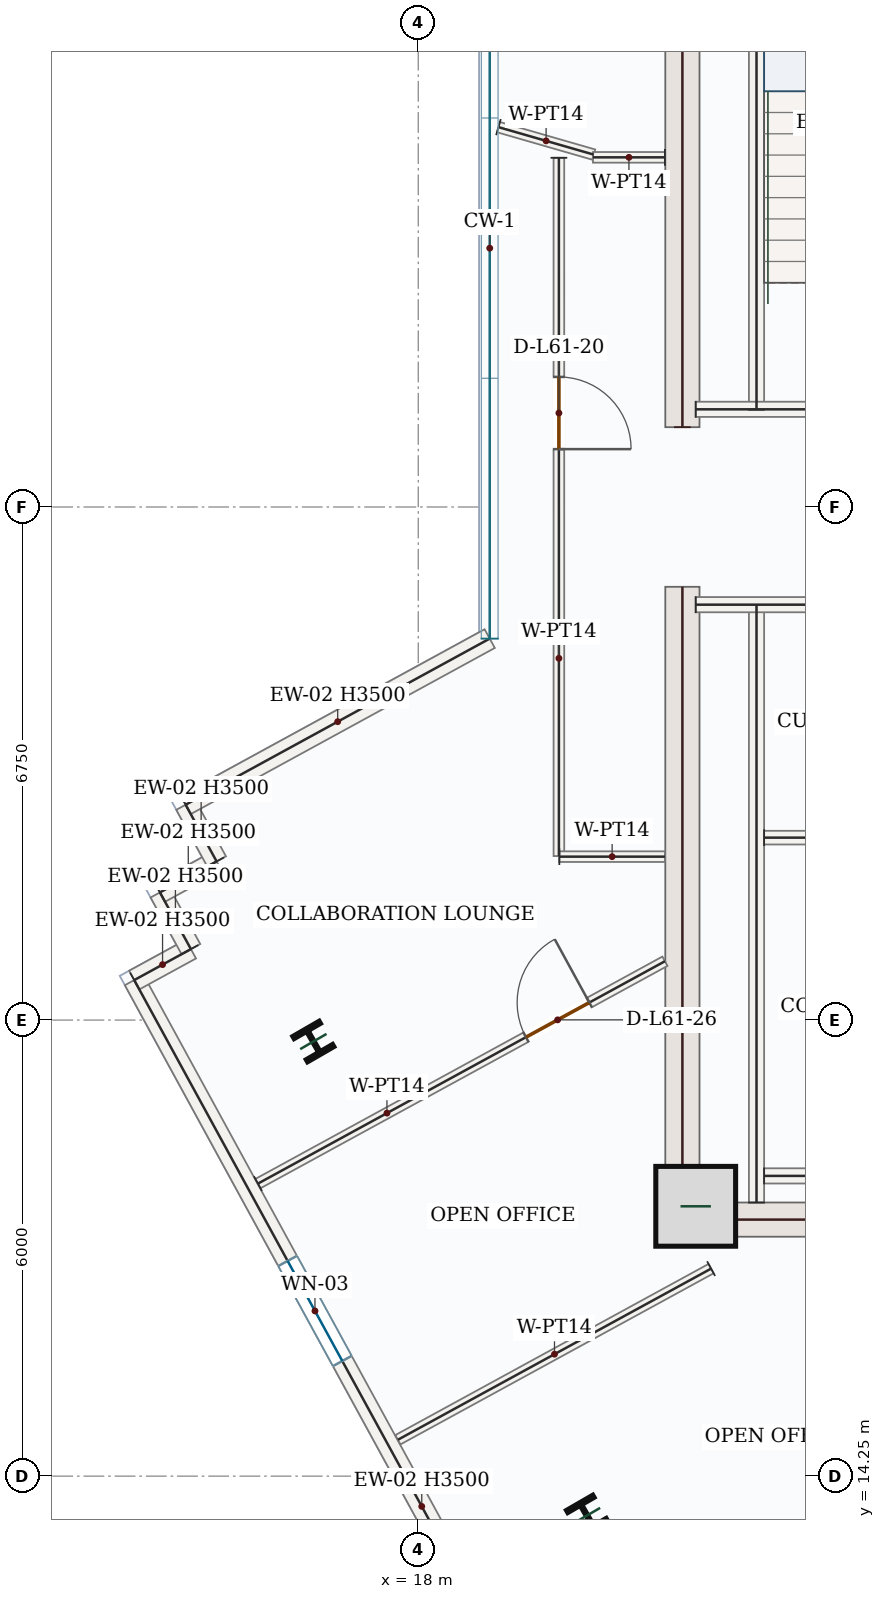
"""IFC4 building model, lengths in metres.
Left out: names, types, materials, properties, quantities, classifications, styles, units other than length and angle.
Written with IfcOpenShell. Run it as: python <this file> out.ifc"""

import sys

from ifc_helpers import new_model, si_unit, direction, frame, frame_2d, origin, origin_2d, place, context, subcontext, project, spatial, rectangle, i_section, extrude, source, transform, mapped, element, fill, save


model = new_model("IFC4")
c1 = context("Model", 3, precision=1e-05, world=origin(), true_north=direction((0.0, 1.0)))
c2 = subcontext(c1, "Body", "Model", "MODEL_VIEW")
j1 = project(units=[si_unit("LENGTHUNIT", "METRE"), si_unit("PLANEANGLEUNIT", "RADIAN")], contexts=[c1])
p1 = place(None, origin())
s1 = spatial("IfcSite", under=j1, at=p1, CompositionType="ELEMENT")
p2 = place(p1, origin())
s2 = spatial("IfcBuilding", under=s1, at=p2, CompositionType="ELEMENT")
p3 = place(p2, frame((0.0, 0.0, 257.85)))
s3 = spatial("IfcBuildingStorey", under=s2, at=p3, CompositionType="ELEMENT", Elevation=257.85)
m1 = source(origin(), c2, "Body", "SweptSolid", [
    extrude(rectangle(XDim=8.55, YDim=0.45, at=frame_2d((4.275, 0.0))), origin(), (0.0, 0.0, 1.0), 3.5),
])
for number, where, z_axis, x_axis in (
    (1, (21.475, 17.4, 0.0), (0.0, 0.0, 1.0), (0.0, 1.0, 0.0)),
    (2, (21.475, 28.05, 0.0), (0.0, 0.0, 1.0), (0.0, 1.0, 0.0)),
):
    element("IfcWall", number, at=place(p3, frame(where, z_axis=z_axis, x_axis=x_axis)), inside=s3, PredefinedType="SHEAR", context=c2, shape_type="MappedRepresentation", body=[
        mapped(m1, transform((0.0, 0.0, 0.0), x_axis=(1.0, 0.0, 0.0), y_axis=(0.0, 1.0, 0.0), z_axis=(0.0, 0.0, 1.0), scale=1.0)),
    ])
m2 = source(origin(), c2, "Body", "SweptSolid", [
    extrude(rectangle(XDim=7.1, YDim=0.45, at=frame_2d((3.55, 0.0))), origin(), (0.0, 0.0, 1.0), 3.5),
])
p4 = place(p3, frame((21.7, 17.625, 0.0), z_axis=(0.0, 0.0, 1.0), x_axis=(1.0, 0.0, 0.0)))
e3 = element("IfcWall", 3, at=p4, inside=s3, PredefinedType="SHEAR", context=c2, shape_type="MappedRepresentation", body=[
    mapped(m2, transform((0.0, 0.0, 0.0), x_axis=(1.0, 0.0, 0.0), y_axis=(0.0, 1.0, 0.0), z_axis=(0.0, 0.0, 1.0), scale=1.0)),
])
m3 = source(origin(), c2, "Body", "SweptSolid", [
    extrude(rectangle(XDim=1.05, YDim=1.05, at=origin_2d()), origin(), (0.0, 0.0, 1.0), 3.75),
])
p5 = place(p3, frame((21.65, 17.8, 0.0), z_axis=(0.0, 0.0, 1.0), x_axis=(1.0, 0.0, 0.0)))
e4 = element("IfcColumn", 4, at=p5, inside=s3, PredefinedType="COLUMN", context=c2, shape_type="MappedRepresentation", body=[
    mapped(m3, transform((0.0, 0.0, 0.0), x_axis=(1.0, 0.0, 0.0), y_axis=(0.0, 1.0, 0.0), z_axis=(0.0, 0.0, 1.0), scale=1.0)),
])
m4 = source(origin(), c2, "Body", "SweptSolid", [
    extrude(i_section(OverallWidth=0.399, OverallDepth=0.386, WebThickness=0.021, FlangeThickness=0.033, FilletRadius=0.018, at=origin_2d()), origin(), (0.0, 0.0, 1.0), 3.75),
])
for number, where, z_axis, x_axis in (
    (5, (16.62, 19.968, 0.0), (0.0, 0.0, 1.0), (0.866, 0.5, 0.0)),
    (6, (20.22, 13.732, 0.0), (0.0, 0.0, 1.0), (0.866, 0.5, 0.0)),
):
    element("IfcColumn", number, at=place(p3, frame(where, z_axis=z_axis, x_axis=x_axis)), inside=s3, PredefinedType="COLUMN", context=c2, shape_type="MappedRepresentation", body=[
        mapped(m4, transform((0.0, 0.0, 0.0), x_axis=(1.0, 0.0, 0.0), y_axis=(0.0, 1.0, 0.0), z_axis=(0.0, 0.0, 1.0), scale=1.0)),
    ])
p6 = place(p3, frame((27.451, 14.74, 0.0), z_axis=(0.0, 0.0, 1.0), x_axis=(-0.877569176667, -0.479450039279, 0.0)))
e7 = element("IfcWall", 7, at=p6, inside=s3, PredefinedType="SOLIDWALL", context=c2, shape_type="SweptSolid", body=[
    extrude(rectangle(XDim=6.979, YDim=0.28, at=frame_2d((3.49, 0.0))), origin(), (0.0, 0.0, 1.0), 3.5),
])
p7 = place(p6, frame((2.74, 0.0, 0.85)))
e8 = element("IfcOpeningElement", 8, at=p7, cuts=e7, PredefinedType="OPENING", context=c2, shape_type="SweptSolid", body=[
    extrude(rectangle(XDim=1.5, YDim=1.5, at=frame_2d((0.75, 0.75))), frame((0.0, 0.15, 0.0), z_axis=(0.0, -1.0, 0.0), x_axis=(1.0, 0.0, 0.0)), (0.0, 0.0, 1.0), 0.3),
])
p8 = place(p3, frame((19.019, 12.071, 0.0), z_axis=(0.0, 0.0, 1.0), x_axis=(-0.479472774144, 0.877556755347, 0.0)))
e9 = element("IfcWall", 9, at=p8, inside=s3, PredefinedType="SOLIDWALL", context=c2, shape_type="SweptSolid", body=[
    extrude(rectangle(XDim=9.92, YDim=0.28, at=frame_2d((4.96, 0.0))), origin(), (0.0, 0.0, 1.0), 3.5),
])
p9 = place(p8, frame((4.21, 0.0, 0.85)))
e10 = element("IfcOpeningElement", 10, at=p9, cuts=e9, PredefinedType="OPENING", context=c2, shape_type="SweptSolid", body=[
    extrude(rectangle(XDim=1.5, YDim=1.5, at=frame_2d((0.75, 0.75))), frame((0.0, 0.15, 0.0), z_axis=(0.0, -1.0, 0.0), x_axis=(1.0, 0.0, 0.0)), (0.0, 0.0, 1.0), 0.3),
])
m5 = source(origin(), c2, "Body", "SweptSolid", [
    extrude(rectangle(XDim=0.85, YDim=0.28, at=frame_2d((0.425, 0.0))), origin(), (0.0, 0.0, 1.0), 3.5),
])
p10 = place(p3, frame((14.263, 20.776, 0.0), z_axis=(0.0, 0.0, 1.0), x_axis=(0.87752219781, 0.479536017782, 0.0)))
e11 = element("IfcWall", 11, at=p10, inside=s3, PredefinedType="SOLIDWALL", context=c2, shape_type="MappedRepresentation", body=[
    mapped(m5, transform((0.0, 0.0, 0.0), x_axis=(1.0, 0.0, 0.0), y_axis=(0.0, 1.0, 0.0), z_axis=(0.0, 0.0, 1.0), scale=1.0)),
])
m6 = source(origin(), c2, "Body", "SweptSolid", [
    extrude(rectangle(XDim=0.85, YDim=0.28, at=frame_2d((0.425, 0.0))), origin(), (0.0, 0.0, 1.0), 3.5),
])
for number, where, z_axis, x_axis in (
    (12, (15.009, 21.184, 0.0), (0.0, 0.0, 1.0), (-0.479, 0.878, 0.0)),
    (13, (14.601, 21.929, 0.0), (0.0, 0.0, 1.0), (0.878, 0.479, 0.0)),
):
    element("IfcWall", number, at=place(p3, frame(where, z_axis=z_axis, x_axis=x_axis)), inside=s3, PredefinedType="SOLIDWALL", context=c2, shape_type="MappedRepresentation", body=[
        mapped(m6, transform((0.0, 0.0, 0.0), x_axis=(1.0, 0.0, 0.0), y_axis=(0.0, 1.0, 0.0), z_axis=(0.0, 0.0, 1.0), scale=1.0)),
    ])
m7 = source(origin(), c2, "Body", "SweptSolid", [
    extrude(rectangle(XDim=0.85, YDim=0.28, at=frame_2d((0.425, 0.0))), origin(), (0.0, 0.0, 1.0), 3.5),
])
p11 = place(p3, frame((15.347, 22.337, 0.0), z_axis=(0.0, 0.0, 1.0), x_axis=(-0.479314855696, 0.877643019177, 0.0)))
e14 = element("IfcWall", 14, at=p11, inside=s3, PredefinedType="SOLIDWALL", context=c2, shape_type="MappedRepresentation", body=[
    mapped(m7, transform((0.0, 0.0, 0.0), x_axis=(1.0, 0.0, 0.0), y_axis=(0.0, 1.0, 0.0), z_axis=(0.0, 0.0, 1.0), scale=1.0)),
])
m8 = source(origin(), c2, "Body", "SweptSolid", [
    extrude(rectangle(XDim=4.558, YDim=0.28, at=frame_2d((2.279, 0.0))), origin(), (0.0, 0.0, 1.0), 3.5),
])
p12 = place(p3, frame((14.94, 23.083, 0.0), z_axis=(0.0, 0.0, 1.0), x_axis=(0.877563774399, 0.479459927276, 0.0)))
e15 = element("IfcWall", 15, at=p12, inside=s3, PredefinedType="SOLIDWALL", context=c2, shape_type="MappedRepresentation", body=[
    mapped(m8, transform((0.0, 0.0, 0.0), x_axis=(1.0, 0.0, 0.0), y_axis=(0.0, 1.0, 0.0), z_axis=(0.0, 0.0, 1.0), scale=1.0)),
])
m9 = source(origin(), c2, "Body", "SweptSolid", [
    extrude(rectangle(XDim=7.87, YDim=0.2, at=frame_2d((3.935, 0.0))), origin(), (0.0, 0.0, 1.0), 3.5),
])
for number, where, z_axis, x_axis in (
    (16, (22.45, 17.85, 0.0), (0.0, 0.0, 1.0), (0.0, 1.0, 0.0)),
    (17, (22.45, 28.28, 0.0), (0.0, 0.0, 1.0), (0.0, 1.0, 0.0)),
):
    element("IfcWall", number, at=place(p3, frame(where, z_axis=z_axis, x_axis=x_axis)), inside=s3, PredefinedType="SOLIDWALL", context=c2, shape_type="MappedRepresentation", body=[
        mapped(m9, transform((0.0, 0.0, 0.0), x_axis=(1.0, 0.0, 0.0), y_axis=(0.0, 1.0, 0.0), z_axis=(0.0, 0.0, 1.0), scale=1.0)),
    ])
m10 = source(origin(), c2, "Body", "SweptSolid", [
    extrude(rectangle(XDim=4.25, YDim=0.2, at=frame_2d((2.125, 0.0))), origin(), (0.0, 0.0, 1.0), 3.5),
])
for number, where, z_axis, x_axis in (
    (18, (21.65, 25.715, 0.0), (0.0, 0.0, 1.0), (1.0, 0.0, 0.0)),
    (19, (21.65, 28.285, 0.0), (0.0, 0.0, 1.0), (1.0, 0.0, 0.0)),
):
    element("IfcWall", number, at=place(p3, frame(where, z_axis=z_axis, x_axis=x_axis)), inside=s3, PredefinedType="SOLIDWALL", context=c2, shape_type="MappedRepresentation", body=[
        mapped(m10, transform((0.0, 0.0, 0.0), x_axis=(1.0, 0.0, 0.0), y_axis=(0.0, 1.0, 0.0), z_axis=(0.0, 0.0, 1.0), scale=1.0)),
    ])
m11 = source(origin(), c2, "Body", "SweptSolid", [
    extrude(rectangle(XDim=3.25, YDim=0.2, at=frame_2d((1.625, 0.0))), origin(), (0.0, 0.0, 1.0), 3.5),
])
p13 = place(p3, frame((22.55, 18.2, 0.0), z_axis=(0.0, 0.0, 1.0), x_axis=(1.0, 0.0, 0.0)))
e20 = element("IfcWall", 20, at=p13, inside=s3, PredefinedType="SOLIDWALL", context=c2, shape_type="MappedRepresentation", body=[
    mapped(m11, transform((0.0, 0.0, 0.0), x_axis=(1.0, 0.0, 0.0), y_axis=(0.0, 1.0, 0.0), z_axis=(0.0, 0.0, 1.0), scale=1.0)),
])
m12 = source(origin(), c2, "Body", "SweptSolid", [
    extrude(rectangle(XDim=3.25, YDim=0.18, at=frame_2d((1.625, 0.0))), origin(), (0.0, 0.0, 1.0), 3.5),
])
p14 = place(p3, frame((22.55, 22.65, 0.0), z_axis=(0.0, 0.0, 1.0), x_axis=(1.0, 0.0, 0.0)))
e21 = element("IfcWall", 21, at=p14, inside=s3, PredefinedType="PARTITIONING", context=c2, shape_type="MappedRepresentation", body=[
    mapped(m12, transform((0.0, 0.0, 0.0), x_axis=(1.0, 0.0, 0.0), y_axis=(0.0, 1.0, 0.0), z_axis=(0.0, 0.0, 1.0), scale=1.0)),
])
m13 = source(origin(), c2, "Body", "SweptSolid", [
    extrude(rectangle(XDim=4.695, YDim=0.14, at=frame_2d((2.348, 0.0))), origin(), (0.0, 0.0, 1.0), 3.5),
])
p15 = place(p3, frame((21.852, 16.98, 0.0), z_axis=(0.0, 0.0, 1.0), x_axis=(-0.877559526902, -0.479467701461, 0.0)))
e22 = element("IfcWall", 22, at=p15, inside=s3, PredefinedType="PARTITIONING", context=c2, shape_type="MappedRepresentation", body=[
    mapped(m13, transform((0.0, 0.0, 0.0), x_axis=(1.0, 0.0, 0.0), y_axis=(0.0, 1.0, 0.0), z_axis=(0.0, 0.0, 1.0), scale=1.0)),
])
p16 = place(p3, frame((15.891, 18.099, 0.0), z_axis=(0.0, 0.0, 1.0), x_axis=(0.877574248726, 0.479440755436, 0.0)))
e23 = element("IfcWall", 23, at=p16, inside=s3, PredefinedType="PARTITIONING", context=c2, shape_type="SweptSolid", body=[
    extrude(rectangle(XDim=6.102, YDim=0.14, at=frame_2d((3.051, 0.0))), origin(), (0.0, 0.0, 1.0), 3.5),
])
p17 = place(p16, frame((4.018, 0.0, 0.0)))
e24 = element("IfcOpeningElement", 24, at=p17, cuts=e23, PredefinedType="OPENING", context=c2, shape_type="SweptSolid", body=[
    extrude(rectangle(XDim=0.95, YDim=2.15, at=frame_2d((0.475, 1.075))), frame((0.0, 0.08, 0.0), z_axis=(0.0, -1.0, 0.0), x_axis=(1.0, 0.0, 0.0)), (0.0, 0.0, 1.0), 0.16),
])
m14 = source(origin(), c2, "Body", "SweptSolid", [
    extrude(rectangle(XDim=1.305, YDim=0.14, at=frame_2d((0.652, 0.0))), origin(), (0.0, 0.0, 1.0), 3.5),
])
p18 = place(p3, frame((19.055, 31.998, 0.0), z_axis=(0.0, 0.0, 1.0), x_axis=(0.960836047515, -0.2771174657, 0.0)))
e25 = element("IfcWall", 25, at=p18, inside=s3, PredefinedType="PARTITIONING", context=c2, shape_type="MappedRepresentation", body=[
    mapped(m14, transform((0.0, 0.0, 0.0), x_axis=(1.0, 0.0, 0.0), y_axis=(0.0, 1.0, 0.0), z_axis=(0.0, 0.0, 1.0), scale=1.0)),
])
p19 = place(p3, frame((19.85, 31.594, 0.0), z_axis=(0.0, 0.0, 1.0), x_axis=(2.657666e-05, -0.999999999647, 0.0)))
e26 = element("IfcWall", 26, at=p19, inside=s3, PredefinedType="PARTITIONING", context=c2, shape_type="SweptSolid", body=[
    extrude(rectangle(XDim=9.186, YDim=0.14, at=frame_2d((4.593, 0.0))), origin(), (0.0, 0.0, 1.0), 3.5),
])
p20 = place(p19, frame((2.883, 0.0, 0.0)))
e27 = element("IfcOpeningElement", 27, at=p20, cuts=e26, PredefinedType="OPENING", context=c2, shape_type="SweptSolid", body=[
    extrude(rectangle(XDim=0.95, YDim=2.15, at=frame_2d((0.475, 1.075))), frame((0.0, 0.08, 0.0), z_axis=(0.0, -1.0, 0.0), x_axis=(1.0, 0.0, 0.0)), (0.0, 0.0, 1.0), 0.16),
])
m15 = source(origin(), c2, "Body", "SweptSolid", [
    extrude(rectangle(XDim=1.389, YDim=0.14, at=frame_2d((0.695, 0.0))), origin(), (0.0, 0.0, 1.0), 3.5),
])
p21 = place(p3, frame((19.856, 22.4, 0.0), z_axis=(0.0, 0.0, 1.0), x_axis=(1.0, 0.0, 0.0)))
e28 = element("IfcWall", 28, at=p21, inside=s3, PredefinedType="PARTITIONING", context=c2, shape_type="MappedRepresentation", body=[
    mapped(m15, transform((0.0, 0.0, 0.0), x_axis=(1.0, 0.0, 0.0), y_axis=(0.0, 1.0, 0.0), z_axis=(0.0, 0.0, 1.0), scale=1.0)),
])
m16 = source(origin(), c2, "Body", "SweptSolid", [
    extrude(rectangle(XDim=0.947, YDim=0.14, at=frame_2d((0.474, 0.0))), origin(), (0.0, 0.0, 1.0), 3.5),
])
p22 = place(p3, frame((21.245, 31.6, 0.0), z_axis=(0.0, 0.0, 1.0), x_axis=(-1.0, 0.0, 0.0)))
e29 = element("IfcWall", 29, at=p22, inside=s3, PredefinedType="PARTITIONING", context=c2, shape_type="MappedRepresentation", body=[
    mapped(m16, transform((0.0, 0.0, 0.0), x_axis=(1.0, 0.0, 0.0), y_axis=(0.0, 1.0, 0.0), z_axis=(0.0, 0.0, 1.0), scale=1.0)),
])
m17 = source(origin(), c2, "Body", "SweptSolid", [
    extrude(rectangle(XDim=1.5, YDim=1.5, at=frame_2d((0.75, 0.75))), frame((0.0, 0.03, 0.0), z_axis=(0.0, -1.0, 0.0), x_axis=(1.0, 0.0, 0.0)), (0.0, 0.0, 1.0), 0.06),
])
p23 = place(p9, origin())
e30 = element("IfcWindow", 30, at=p23, inside=s3, PartitioningType="SINGLE_PANEL", PredefinedType="WINDOW", context=c2, shape_type="MappedRepresentation", body=[
    mapped(m17, transform((0.0, 0.0, 0.0), x_axis=(1.0, 0.0, 0.0), y_axis=(0.0, 1.0, 0.0), z_axis=(0.0, 0.0, 1.0), scale=1.0)),
])
fill(e10, e30)
m18 = source(origin(), c2, "Body", "SweptSolid", [
    extrude(rectangle(XDim=0.95, YDim=2.15, at=frame_2d((0.475, 1.075))), frame((0.0, 0.025, 0.0), z_axis=(0.0, -1.0, 0.0), x_axis=(1.0, 0.0, 0.0)), (0.0, 0.0, 1.0), 0.05),
])
p24 = place(p20, origin())
e31 = element("IfcDoor", 31, at=p24, inside=s3, OperationType="SINGLE_SWING_RIGHT", PredefinedType="DOOR", context=c2, shape_type="MappedRepresentation", body=[
    mapped(m18, transform((0.0, 0.0, 0.0), x_axis=(1.0, 0.0, 0.0), y_axis=(0.0, 1.0, 0.0), z_axis=(0.0, 0.0, 1.0), scale=1.0)),
])
fill(e27, e31)
p25 = place(p17, origin())
e32 = element("IfcDoor", 32, at=p25, inside=s3, OperationType="SINGLE_SWING_RIGHT", PredefinedType="DOOR", context=c2, shape_type="MappedRepresentation", body=[
    mapped(m18, transform((0.0, 0.0, 0.0), x_axis=(1.0, 0.0, 0.0), y_axis=(0.0, 1.0, 0.0), z_axis=(0.0, 0.0, 1.0), scale=1.0)),
])
fill(e24, e32)
save(model, sys.argv[1])
